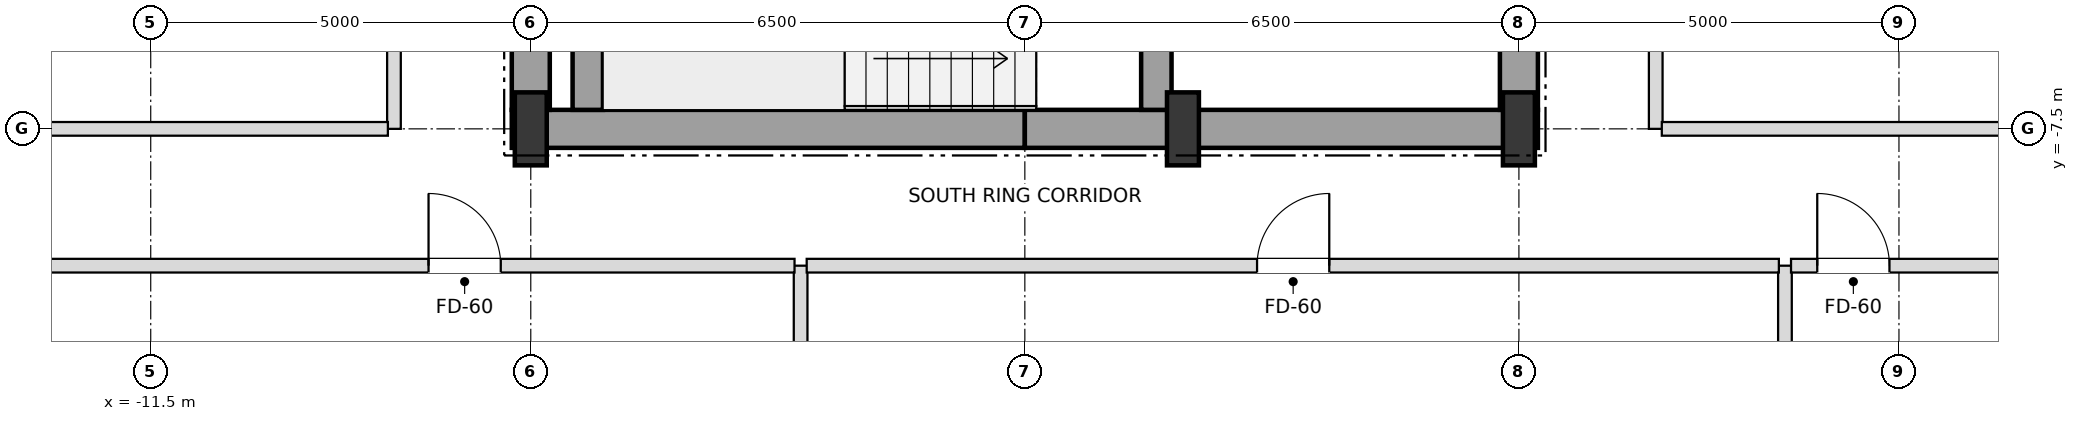
"""IFC4 building model, lengths in metres.
Left out: names, types, materials, properties, quantities, classifications, styles, units other than length and angle.
Written with IfcOpenShell. Run it as: python <this file> out.ifc"""

import sys

from ifc_helpers import new_model, si_unit, direction, frame, frame_2d, origin, origin_2d, place, context, subcontext, project, spatial, rectangle, i_section, extrude, element, fill, save


model = new_model("IFC4")
c1 = context("Model", 3, precision=1e-05, world=origin(), true_north=direction((0.0, 1.0)))
c2 = subcontext(c1, "Body", "Model", "MODEL_VIEW")
j1 = project(units=[si_unit("LENGTHUNIT", "METRE"), si_unit("PLANEANGLEUNIT", "RADIAN")], contexts=[c1])
p1 = place(None, origin())
s1 = spatial("IfcSite", under=j1, at=p1, CompositionType="ELEMENT")
p2 = place(p1, origin())
s2 = spatial("IfcBuilding", under=s1, at=p2, CompositionType="ELEMENT")
p3 = place(p2, frame((0.0, 0.0, 82.8)))
s3 = spatial("IfcBuildingStorey", under=s2, at=p3, CompositionType="ELEMENT", Elevation=82.8)
for number, where, z_axis, x_axis in (
    (1, (-6.5, -7.5, 0.0), (0.0, 0.0, 1.0), (1.0, 0.0, 0.0)),
    (2, (2.08, -7.5, 0.0), (0.0, 0.0, 1.0), (1.0, 0.0, 0.0)),
    (3, (6.5, -7.5, 0.0), (0.0, 0.0, 1.0), (1.0, 0.0, 0.0)),
):
    element("IfcColumn", number, at=place(p3, frame(where, z_axis=z_axis, x_axis=x_axis)), inside=s3, PredefinedType="COLUMN", context=c2, shape_type="SweptSolid", body=[
        extrude(i_section(OverallWidth=0.42, OverallDepth=0.96, WebThickness=0.022, FlangeThickness=0.034, at=origin_2d()), origin(), (0.0, 0.0, 1.0), 3.6),
    ])
for number, where, z_axis, x_axis in (
    (4, (-6.75, -7.5, 0.0), (0.0, 0.0, 1.0), (1.0, 0.0, 0.0)),
    (5, (0.0, -7.5, 0.0), (0.0, 0.0, 1.0), (1.0, 0.0, 0.0)),
):
    element("IfcWall", number, at=place(p3, frame(where, z_axis=z_axis, x_axis=x_axis)), inside=s3, PredefinedType="SHEAR", context=c2, shape_type="SweptSolid", body=[
        extrude(rectangle(XDim=6.75, YDim=0.5, at=frame_2d((3.375, 0.0))), origin(), (0.0, 0.0, 1.0), 3.38),
    ])
p4 = place(p3, frame((-6.5, -7.25, 0.0), z_axis=(0.0, 0.0, 1.0), x_axis=(0.0, 1.0, 0.0)))
e6 = element("IfcWall", 6, at=p4, inside=s3, PredefinedType="SHEAR", context=c2, shape_type="SweptSolid", body=[
    extrude(rectangle(XDim=3.55, YDim=0.5, at=frame_2d((1.775, 0.0))), origin(), (0.0, 0.0, 1.0), 3.38),
])
p5 = place(p3, frame((6.5, -7.25, 0.0), z_axis=(0.0, 0.0, 1.0), x_axis=(0.0, 1.0, 0.0)))
e7 = element("IfcWall", 7, at=p5, inside=s3, PredefinedType="SHEAR", context=c2, shape_type="SweptSolid", body=[
    extrude(rectangle(XDim=5.75, YDim=0.5, at=frame_2d((2.875, 0.0))), origin(), (0.0, 0.0, 1.0), 3.38),
])
p6 = place(p5, frame((0.85, 0.0, 0.0)))
e8 = element("IfcOpeningElement", 8, at=p6, cuts=e7, PredefinedType="OPENING", context=c2, shape_type="SweptSolid", body=[
    extrude(rectangle(XDim=1.05, YDim=2.15, at=frame_2d((0.525, 1.075))), frame((0.0, 0.26, 0.0), z_axis=(0.0, -1.0, 0.0), x_axis=(1.0, 0.0, 0.0)), (0.0, 0.0, 1.0), 0.52),
])
p7 = place(p3, frame((-5.75, -7.25, 0.0), z_axis=(0.0, 0.0, 1.0), x_axis=(0.0, 1.0, 0.0)))
e9 = element("IfcWall", 9, at=p7, inside=s3, PredefinedType="SHEAR", context=c2, shape_type="SweptSolid", body=[
    extrude(rectangle(XDim=2.9, YDim=0.4, at=frame_2d((1.45, 0.0))), origin(), (0.0, 0.0, 1.0), 3.38),
])
p8 = place(p3, frame((1.73, -7.25, 0.0), z_axis=(0.0, 0.0, 1.0), x_axis=(0.0, 1.0, 0.0)))
e10 = element("IfcWall", 10, at=p8, inside=s3, PredefinedType="SHEAR", context=c2, shape_type="SweptSolid", body=[
    extrude(rectangle(XDim=3.3, YDim=0.4, at=frame_2d((1.65, 0.0))), origin(), (0.0, 0.0, 1.0), 3.38),
])
p9 = place(p8, frame((0.9, 0.0, 0.0)))
e11 = element("IfcOpeningElement", 11, at=p9, cuts=e10, PredefinedType="OPENING", context=c2, shape_type="SweptSolid", body=[
    extrude(rectangle(XDim=1.05, YDim=2.15, at=frame_2d((0.525, 1.075))), frame((0.0, 0.21, 0.0), z_axis=(0.0, -1.0, 0.0), x_axis=(1.0, 0.0, 0.0)), (0.0, 0.0, 1.0), 0.42),
])
p10 = place(p3, frame((-8.3, -7.5, 0.0), z_axis=(0.0, 0.0, 1.0), x_axis=(0.0, 1.0, 0.0)))
e12 = element("IfcWall", 12, at=p10, inside=s3, PredefinedType="PARTITIONING", context=c2, shape_type="SweptSolid", body=[
    extrude(rectangle(XDim=15.0, YDim=0.18, at=frame_2d((7.5, 0.0))), origin(), (0.0, 0.0, 1.0), 3.38),
])
p11 = place(p10, frame((2.075, 0.0, 0.0)))
e13 = element("IfcOpeningElement", 13, at=p11, cuts=e12, PredefinedType="OPENING", context=c2, shape_type="SweptSolid", body=[
    extrude(rectangle(XDim=0.95, YDim=2.15, at=frame_2d((0.475, 1.075))), frame((0.0, 0.1, 0.0), z_axis=(0.0, -1.0, 0.0), x_axis=(1.0, 0.0, 0.0)), (0.0, 0.0, 1.0), 0.2),
])
p12 = place(p10, frame((8.475, 0.0, 0.0)))
e14 = element("IfcOpeningElement", 14, at=p12, cuts=e12, PredefinedType="OPENING", context=c2, shape_type="SweptSolid", body=[
    extrude(rectangle(XDim=0.95, YDim=2.15, at=frame_2d((0.475, 1.075))), frame((0.0, 0.1, 0.0), z_axis=(0.0, -1.0, 0.0), x_axis=(1.0, 0.0, 0.0)), (0.0, 0.0, 1.0), 0.2),
])
p13 = place(p10, frame((13.425, 0.0, 0.0)))
e15 = element("IfcOpeningElement", 15, at=p13, cuts=e12, PredefinedType="OPENING", context=c2, shape_type="SweptSolid", body=[
    extrude(rectangle(XDim=0.95, YDim=2.15, at=frame_2d((0.475, 1.075))), frame((0.0, 0.1, 0.0), z_axis=(0.0, -1.0, 0.0), x_axis=(1.0, 0.0, 0.0)), (0.0, 0.0, 1.0), 0.2),
])
p14 = place(p3, frame((-2.95, -24.9, 0.0), z_axis=(0.0, 0.0, 1.0), x_axis=(0.0, 1.0, 0.0)))
e16 = element("IfcWall", 16, at=p14, inside=s3, PredefinedType="PARTITIONING", context=c2, shape_type="SweptSolid", body=[
    extrude(rectangle(XDim=15.6, YDim=0.18, at=frame_2d((7.8, 0.0))), origin(), (0.0, 0.0, 1.0), 2.816),
])
p15 = place(p3, frame((8.3, -7.5, 0.0), z_axis=(0.0, 0.0, 1.0), x_axis=(0.0, 1.0, 0.0)))
e17 = element("IfcWall", 17, at=p15, inside=s3, PredefinedType="PARTITIONING", context=c2, shape_type="SweptSolid", body=[
    extrude(rectangle(XDim=15.0, YDim=0.18, at=frame_2d((7.5, 0.0))), origin(), (0.0, 0.0, 1.0), 3.38),
])
p16 = place(p15, frame((2.075, 0.0, 0.0)))
e18 = element("IfcOpeningElement", 18, at=p16, cuts=e17, PredefinedType="OPENING", context=c2, shape_type="SweptSolid", body=[
    extrude(rectangle(XDim=0.95, YDim=2.15, at=frame_2d((0.475, 1.075))), frame((0.0, 0.1, 0.0), z_axis=(0.0, -1.0, 0.0), x_axis=(1.0, 0.0, 0.0)), (0.0, 0.0, 1.0), 0.2),
])
p17 = place(p15, frame((8.475, 0.0, 0.0)))
e19 = element("IfcOpeningElement", 19, at=p17, cuts=e17, PredefinedType="OPENING", context=c2, shape_type="SweptSolid", body=[
    extrude(rectangle(XDim=0.95, YDim=2.15, at=frame_2d((0.475, 1.075))), frame((0.0, 0.1, 0.0), z_axis=(0.0, -1.0, 0.0), x_axis=(1.0, 0.0, 0.0)), (0.0, 0.0, 1.0), 0.2),
])
p18 = place(p15, frame((13.425, 0.0, 0.0)))
e20 = element("IfcOpeningElement", 20, at=p18, cuts=e17, PredefinedType="OPENING", context=c2, shape_type="SweptSolid", body=[
    extrude(rectangle(XDim=0.95, YDim=2.15, at=frame_2d((0.475, 1.075))), frame((0.0, 0.1, 0.0), z_axis=(0.0, -1.0, 0.0), x_axis=(1.0, 0.0, 0.0)), (0.0, 0.0, 1.0), 0.2),
])
p19 = place(p3, frame((10.0, -24.9, 0.0), z_axis=(0.0, 0.0, 1.0), x_axis=(0.0, 1.0, 0.0)))
e21 = element("IfcWall", 21, at=p19, inside=s3, PredefinedType="PARTITIONING", context=c2, shape_type="SweptSolid", body=[
    extrude(rectangle(XDim=15.6, YDim=0.18, at=frame_2d((7.8, 0.0))), origin(), (0.0, 0.0, 1.0), 2.816),
])
p20 = place(p19, frame((6.015, 0.0, 0.0)))
e22 = element("IfcOpeningElement", 22, at=p20, cuts=e21, PredefinedType="OPENING", context=c2, shape_type="SweptSolid", body=[
    extrude(rectangle(XDim=0.95, YDim=2.15, at=frame_2d((0.475, 1.075))), frame((0.0, 0.1, 0.0), z_axis=(0.0, -1.0, 0.0), x_axis=(1.0, 0.0, 0.0)), (0.0, 0.0, 1.0), 0.2),
])
p21 = place(p3, frame((-18.4, -9.3, 0.0), z_axis=(0.0, 0.0, 1.0), x_axis=(1.0, 0.0, 0.0)))
e23 = element("IfcWall", 23, at=p21, inside=s3, PredefinedType="PARTITIONING", context=c2, shape_type="SweptSolid", body=[
    extrude(rectangle(XDim=15.37, YDim=0.18, at=frame_2d((7.685, 0.0))), origin(), (0.0, 0.0, 1.0), 2.816),
])
p22 = place(p21, frame((10.555, 0.0, 0.0)))
e24 = element("IfcOpeningElement", 24, at=p22, cuts=e23, PredefinedType="OPENING", context=c2, shape_type="SweptSolid", body=[
    extrude(rectangle(XDim=0.95, YDim=2.15, at=frame_2d((0.475, 1.075))), frame((0.0, 0.1, 0.0), z_axis=(0.0, -1.0, 0.0), x_axis=(1.0, 0.0, 0.0)), (0.0, 0.0, 1.0), 0.2),
])
p23 = place(p3, frame((-2.87, -9.3, 0.0), z_axis=(0.0, 0.0, 1.0), x_axis=(1.0, 0.0, 0.0)))
e25 = element("IfcWall", 25, at=p23, inside=s3, PredefinedType="PARTITIONING", context=c2, shape_type="SweptSolid", body=[
    extrude(rectangle(XDim=12.79, YDim=0.18, at=frame_2d((6.395, 0.0))), origin(), (0.0, 0.0, 1.0), 2.816),
])
p24 = place(p23, frame((5.925, 0.0, 0.0)))
e26 = element("IfcOpeningElement", 26, at=p24, cuts=e25, PredefinedType="OPENING", context=c2, shape_type="SweptSolid", body=[
    extrude(rectangle(XDim=0.95, YDim=2.15, at=frame_2d((0.475, 1.075))), frame((0.0, 0.1, 0.0), z_axis=(0.0, -1.0, 0.0), x_axis=(1.0, 0.0, 0.0)), (0.0, 0.0, 1.0), 0.2),
])
p25 = place(p3, frame((10.08, -9.3, 0.0), z_axis=(0.0, 0.0, 1.0), x_axis=(1.0, 0.0, 0.0)))
e27 = element("IfcWall", 27, at=p25, inside=s3, PredefinedType="PARTITIONING", context=c2, shape_type="SweptSolid", body=[
    extrude(rectangle(XDim=8.24, YDim=0.18, at=frame_2d((4.12, 0.0))), origin(), (0.0, 0.0, 1.0), 2.816),
])
p26 = place(p25, frame((0.345, 0.0, 0.0)))
e28 = element("IfcOpeningElement", 28, at=p26, cuts=e27, PredefinedType="OPENING", context=c2, shape_type="SweptSolid", body=[
    extrude(rectangle(XDim=0.95, YDim=2.15, at=frame_2d((0.475, 1.075))), frame((0.0, 0.1, 0.0), z_axis=(0.0, -1.0, 0.0), x_axis=(1.0, 0.0, 0.0)), (0.0, 0.0, 1.0), 0.2),
])
for number, where, z_axis, x_axis in (
    (29, (-21.9, -7.5, 0.0), (0.0, 0.0, 1.0), (1.0, 0.0, 0.0)),
    (30, (8.38, -7.5, 0.0), (0.0, 0.0, 1.0), (1.0, 0.0, 0.0)),
):
    element("IfcWall", number, at=place(p3, frame(where, z_axis=z_axis, x_axis=x_axis)), inside=s3, PredefinedType="PARTITIONING", context=c2, shape_type="SweptSolid", body=[
        extrude(rectangle(XDim=13.52, YDim=0.18, at=frame_2d((6.76, 0.0))), origin(), (0.0, 0.0, 1.0), 2.816),
    ])
p27 = place(p26, origin())
e31 = element("IfcDoor", 31, at=p27, inside=s3, OperationType="SINGLE_SWING_LEFT", PredefinedType="DOOR", context=c2, shape_type="SweptSolid", body=[
    extrude(rectangle(XDim=0.95, YDim=2.15, at=frame_2d((0.475, 1.075))), frame((0.0, 0.025, 0.0), z_axis=(0.0, -1.0, 0.0), x_axis=(1.0, 0.0, 0.0)), (0.0, 0.0, 1.0), 0.05),
])
fill(e28, e31)
p28 = place(p22, origin())
e32 = element("IfcDoor", 32, at=p28, inside=s3, OperationType="SINGLE_SWING_LEFT", PredefinedType="DOOR", context=c2, shape_type="SweptSolid", body=[
    extrude(rectangle(XDim=0.95, YDim=2.15, at=frame_2d((0.475, 1.075))), frame((0.0, 0.025, 0.0), z_axis=(0.0, -1.0, 0.0), x_axis=(1.0, 0.0, 0.0)), (0.0, 0.0, 1.0), 0.05),
])
fill(e24, e32)
p29 = place(p24, origin())
e33 = element("IfcDoor", 33, at=p29, inside=s3, OperationType="SINGLE_SWING_RIGHT", PredefinedType="DOOR", context=c2, shape_type="SweptSolid", body=[
    extrude(rectangle(XDim=0.95, YDim=2.15, at=frame_2d((0.475, 1.075))), frame((0.0, 0.025, 0.0), z_axis=(0.0, -1.0, 0.0), x_axis=(1.0, 0.0, 0.0)), (0.0, 0.0, 1.0), 0.05),
])
fill(e26, e33)
save(model, sys.argv[1])
